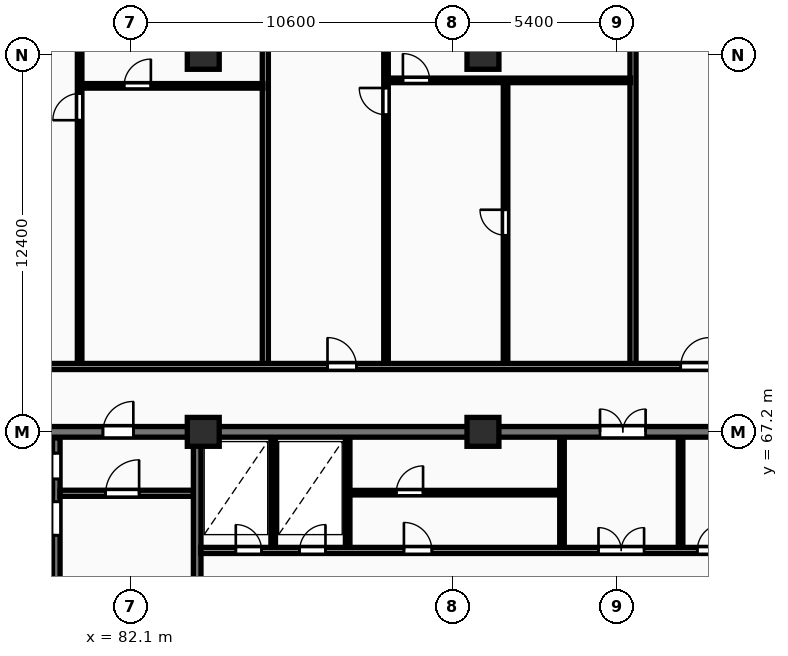
"""IFC4 building model, lengths in metres.
Left out: names, types, materials, properties, quantities, classifications, styles, units other than length and angle.
Written with IfcOpenShell. Run it as: python <this file> out.ifc"""

import sys

from ifc_helpers import new_model, si_unit, direction, frame, frame_2d, origin, origin_2d, place, context, subcontext, project, spatial, rectangle, extrude, element, fill, save


model = new_model("IFC4")
c1 = context("Model", 3, precision=1e-05, world=origin(), true_north=direction((0.0, 1.0)))
c2 = subcontext(c1, "Body", "Model", "MODEL_VIEW")
j1 = project(units=[si_unit("LENGTHUNIT", "METRE"), si_unit("PLANEANGLEUNIT", "RADIAN")], contexts=[c1])
p1 = place(None, origin())
s1 = spatial("IfcSite", under=j1, at=p1, CompositionType="ELEMENT")
p2 = place(p1, origin())
s2 = spatial("IfcBuilding", under=s1, at=p2, CompositionType="ELEMENT")
p3 = place(p2, frame((0.0, 0.0, 24.0)))
s3 = spatial("IfcBuildingStorey", under=s2, at=p3, CompositionType="ELEMENT", Elevation=24.0)
for number, where, z_axis, x_axis in (
    (1, (84.5, 67.2, 0.0), (0.0, 0.0, 1.0), (1.0, 0.0, 0.0)),
    (2, (84.5, 79.6, 0.0), (0.0, 0.0, 1.0), (1.0, 0.0, 0.0)),
    (3, (93.7, 67.2, 0.0), (0.0, 0.0, 1.0), (1.0, 0.0, 0.0)),
    (4, (93.7, 79.6, 0.0), (0.0, 0.0, 1.0), (1.0, 0.0, 0.0)),
):
    element("IfcColumn", number, at=place(p3, frame(where, z_axis=z_axis, x_axis=x_axis)), inside=s3, PredefinedType="COLUMN", context=c2, shape_type="SweptSolid", body=[
        extrude(rectangle(XDim=1.05, YDim=0.95, at=origin_2d()), origin(), (0.0, 0.0, 1.0), 3.25),
    ])
p4 = place(p3, frame((75.95, 67.2, 0.0), z_axis=(0.0, 0.0, 1.0), x_axis=(1.0, 0.0, 0.0)))
e5 = element("IfcWall", 5, at=p4, inside=s3, PredefinedType="SHEAR", context=c2, shape_type="SweptSolid", body=[
    extrude(rectangle(XDim=36.3, YDim=0.35, at=frame_2d((18.15, 0.0))), origin(), (0.0, 0.0, 1.0), 3.25),
])
p5 = place(p4, frame((5.25, 0.0, 0.0)))
e6 = element("IfcOpeningElement", 6, at=p5, cuts=e5, PredefinedType="OPENING", context=c2, shape_type="SweptSolid", body=[
    extrude(rectangle(XDim=1.0, YDim=2.15, at=frame_2d((0.5, 1.075))), frame((0.0, 0.185, 0.0), z_axis=(0.0, -1.0, 0.0), x_axis=(1.0, 0.0, 0.0)), (0.0, 0.0, 1.0), 0.37),
])
p6 = place(p4, frame((21.6, 0.0, 0.0)))
e7 = element("IfcOpeningElement", 7, at=p6, cuts=e5, PredefinedType="OPENING", context=c2, shape_type="SweptSolid", body=[
    extrude(rectangle(XDim=1.5, YDim=2.2, at=frame_2d((0.75, 1.1))), frame((0.0, 0.185, 0.0), z_axis=(0.0, -1.0, 0.0), x_axis=(1.0, 0.0, 0.0)), (0.0, 0.0, 1.0), 0.37),
])
p7 = place(p4, frame((30.45, 0.0, 0.0)))
e8 = element("IfcOpeningElement", 8, at=p7, cuts=e5, PredefinedType="OPENING", context=c2, shape_type="SweptSolid", body=[
    extrude(rectangle(XDim=1.0, YDim=2.15, at=frame_2d((0.5, 1.075))), frame((0.0, 0.185, 0.0), z_axis=(0.0, -1.0, 0.0), x_axis=(1.0, 0.0, 0.0)), (0.0, 0.0, 1.0), 0.37),
])
p8 = place(p3, frame((79.665, 55.4, 0.0), z_axis=(0.0, 0.0, 1.0), x_axis=(0.0, 1.0, 0.0)))
e9 = element("IfcWall", 9, at=p8, inside=s3, PredefinedType="SHEAR", context=c2, shape_type="SweptSolid", body=[
    extrude(rectangle(XDim=11.6, YDim=0.25, at=frame_2d((5.8, 0.0))), origin(), (0.0, 0.0, 1.0), 3.25),
])
p9 = place(p8, frame((0.55, 0.0, 0.0)))
e10 = element("IfcOpeningElement", 10, at=p9, cuts=e9, PredefinedType="OPENING", context=c2, shape_type="SweptSolid", body=[
    extrude(rectangle(XDim=0.85, YDim=2.05, at=frame_2d((0.425, 1.025))), frame((0.0, 0.135, 0.0), z_axis=(0.0, -1.0, 0.0), x_axis=(1.0, 0.0, 0.0)), (0.0, 0.0, 1.0), 0.27),
])
p10 = place(p8, frame((8.4, 0.0, 0.0)))
e11 = element("IfcOpeningElement", 11, at=p10, cuts=e9, PredefinedType="OPENING", context=c2, shape_type="SweptSolid", body=[
    extrude(rectangle(XDim=1.1, YDim=2.1, at=frame_2d((0.55, 1.05))), frame((0.0, 0.135, 0.0), z_axis=(0.0, -1.0, 0.0), x_axis=(1.0, 0.0, 0.0)), (0.0, 0.0, 1.0), 0.27),
])
p11 = place(p8, frame((10.25, 0.0, 0.0)))
e12 = element("IfcOpeningElement", 12, at=p11, cuts=e9, PredefinedType="OPENING", context=c2, shape_type="SweptSolid", body=[
    extrude(rectangle(XDim=0.85, YDim=2.05, at=frame_2d((0.425, 1.025))), frame((0.0, 0.135, 0.0), z_axis=(0.0, -1.0, 0.0), x_axis=(1.0, 0.0, 0.0)), (0.0, 0.0, 1.0), 0.27),
])
p12 = place(p3, frame((76.3, 65.325, 0.0), z_axis=(0.0, 0.0, 1.0), x_axis=(1.0, 0.0, 0.0)))
e13 = element("IfcWall", 13, at=p12, inside=s3, PredefinedType="SHEAR", context=c2, shape_type="SweptSolid", body=[
    extrude(rectangle(XDim=3.24, YDim=0.25, at=frame_2d((1.62, 0.0))), origin(), (0.0, 0.0, 1.0), 3.25),
])
p13 = place(p3, frame((79.79, 65.18, 0.0), z_axis=(0.0, 0.0, 1.0), x_axis=(1.0, 0.0, 0.0)))
e14 = element("IfcWall", 14, at=p13, inside=s3, PredefinedType="PARTITIONING", context=c2, shape_type="SweptSolid", body=[
    extrude(rectangle(XDim=4.39, YDim=0.2, at=frame_2d((2.195, 0.0))), origin(), (0.0, 0.0, 1.0), 2.97),
])
p14 = place(p13, frame((1.5, 0.0, 0.0)))
e15 = element("IfcOpeningElement", 15, at=p14, cuts=e14, PredefinedType="OPENING", context=c2, shape_type="SweptSolid", body=[
    extrude(rectangle(XDim=1.1, YDim=2.1, at=frame_2d((0.55, 1.05))), frame((0.0, 0.11, 0.0), z_axis=(0.0, -1.0, 0.0), x_axis=(1.0, 0.0, 0.0)), (0.0, 0.0, 1.0), 0.22),
])
p15 = place(p3, frame((84.3, 55.4, 0.0), z_axis=(0.0, 0.0, 1.0), x_axis=(0.0, 1.0, 0.0)))
e16 = element("IfcWall", 16, at=p15, inside=s3, PredefinedType="SHEAR", context=c2, shape_type="SweptSolid", body=[
    extrude(rectangle(XDim=11.6, YDim=0.25, at=frame_2d((5.8, 0.0))), origin(), (0.0, 0.0, 1.0), 3.25),
])
p16 = place(p15, frame((5.2, 0.0, 0.0)))
e17 = element("IfcOpeningElement", 17, at=p16, cuts=e16, PredefinedType="OPENING", context=c2, shape_type="SweptSolid", body=[
    extrude(rectangle(XDim=1.1, YDim=2.1, at=frame_2d((0.55, 1.05))), frame((0.0, 0.135, 0.0), z_axis=(0.0, -1.0, 0.0), x_axis=(1.0, 0.0, 0.0)), (0.0, 0.0, 1.0), 0.27),
])
for number, where, z_axis, x_axis in (
    (18, (86.8, 63.4, 0.0), (0.0, 0.0, 1.0), (0.0, 1.0, 0.0)),
    (19, (89.25, 63.4, 0.0), (0.0, 0.0, 1.0), (0.0, 1.0, 0.0)),
):
    element("IfcWall", number, at=place(p3, frame(where, z_axis=z_axis, x_axis=x_axis)), inside=s3, PredefinedType="PARTITIONING", context=c2, shape_type="SweptSolid", body=[
        extrude(rectangle(XDim=3.6, YDim=0.15, at=frame_2d((1.8, 0.0))), origin(), (0.0, 0.0, 1.0), 2.97),
    ])
p17 = place(p3, frame((89.25, 65.2, 0.0), z_axis=(0.0, 0.0, 1.0), x_axis=(1.0, 0.0, 0.0)))
e20 = element("IfcWall", 20, at=p17, inside=s3, PredefinedType="PARTITIONING", context=c2, shape_type="SweptSolid", body=[
    extrude(rectangle(XDim=7.05, YDim=0.15, at=frame_2d((3.525, 0.0))), origin(), (0.0, 0.0, 1.0), 2.97),
])
p18 = place(p17, frame((1.6, 0.0, 0.0)))
e21 = element("IfcOpeningElement", 21, at=p18, cuts=e20, PredefinedType="OPENING", context=c2, shape_type="SweptSolid", body=[
    extrude(rectangle(XDim=0.88, YDim=2.06, at=frame_2d((0.44, 1.03))), frame((0.0, 0.085, 0.0), z_axis=(0.0, -1.0, 0.0), x_axis=(1.0, 0.0, 0.0)), (0.0, 0.0, 1.0), 0.17),
])
for number, where, z_axis, x_axis in (
    (22, (96.3, 63.4, 0.0), (0.0, 0.0, 1.0), (0.0, 1.0, 0.0)),
    (23, (100.2, 63.4, 0.0), (0.0, 0.0, 1.0), (0.0, 1.0, 0.0)),
):
    element("IfcWall", number, at=place(p3, frame(where, z_axis=z_axis, x_axis=x_axis)), inside=s3, PredefinedType="PARTITIONING", context=c2, shape_type="SweptSolid", body=[
        extrude(rectangle(XDim=3.6, YDim=0.15, at=frame_2d((1.8, 0.0))), origin(), (0.0, 0.0, 1.0), 2.97),
    ])
p19 = place(p3, frame((84.42, 63.3, 0.0), z_axis=(0.0, 0.0, 1.0), x_axis=(1.0, 0.0, 0.0)))
e24 = element("IfcWall", 24, at=p19, inside=s3, PredefinedType="PARTITIONING", context=c2, shape_type="SweptSolid", body=[
    extrude(rectangle(XDim=19.83, YDim=0.2, at=frame_2d((9.915, 0.0))), origin(), (0.0, 0.0, 1.0), 2.97),
])
p20 = place(p19, frame((1.15, 0.0, 0.0)))
e25 = element("IfcOpeningElement", 25, at=p20, cuts=e24, PredefinedType="OPENING", context=c2, shape_type="SweptSolid", body=[
    extrude(rectangle(XDim=0.85, YDim=2.05, at=frame_2d((0.425, 1.025))), frame((0.0, 0.11, 0.0), z_axis=(0.0, -1.0, 0.0), x_axis=(1.0, 0.0, 0.0)), (0.0, 0.0, 1.0), 0.22),
])
p21 = place(p19, frame((3.25, 0.0, 0.0)))
e26 = element("IfcOpeningElement", 26, at=p21, cuts=e24, PredefinedType="OPENING", context=c2, shape_type="SweptSolid", body=[
    extrude(rectangle(XDim=0.85, YDim=2.05, at=frame_2d((0.425, 1.025))), frame((0.0, 0.11, 0.0), z_axis=(0.0, -1.0, 0.0), x_axis=(1.0, 0.0, 0.0)), (0.0, 0.0, 1.0), 0.22),
])
p22 = place(p19, frame((13.08, 0.0, 0.0)))
e27 = element("IfcOpeningElement", 27, at=p22, cuts=e24, PredefinedType="OPENING", context=c2, shape_type="SweptSolid", body=[
    extrude(rectangle(XDim=1.5, YDim=2.2, at=frame_2d((0.75, 1.1))), frame((0.0, 0.11, 0.0), z_axis=(0.0, -1.0, 0.0), x_axis=(1.0, 0.0, 0.0)), (0.0, 0.0, 1.0), 0.22),
])
p23 = place(p19, frame((6.68, 0.0, 0.0)))
e28 = element("IfcOpeningElement", 28, at=p23, cuts=e24, PredefinedType="OPENING", context=c2, shape_type="SweptSolid", body=[
    extrude(rectangle(XDim=0.92, YDim=2.08, at=frame_2d((0.46, 1.04))), frame((0.0, 0.11, 0.0), z_axis=(0.0, -1.0, 0.0), x_axis=(1.0, 0.0, 0.0)), (0.0, 0.0, 1.0), 0.22),
])
p24 = place(p19, frame((16.33, 0.0, 0.0)))
e29 = element("IfcOpeningElement", 29, at=p24, cuts=e24, PredefinedType="OPENING", context=c2, shape_type="SweptSolid", body=[
    extrude(rectangle(XDim=0.88, YDim=2.06, at=frame_2d((0.44, 1.03))), frame((0.0, 0.11, 0.0), z_axis=(0.0, -1.0, 0.0), x_axis=(1.0, 0.0, 0.0)), (0.0, 0.0, 1.0), 0.22),
])
p25 = place(p3, frame((86.542, 69.43, 0.0), z_axis=(0.0, 0.0, 1.0), x_axis=(0.0, 1.0, 0.0)))
e30 = element("IfcWall", 30, at=p25, inside=s3, PredefinedType="PARTITIONING", context=c2, shape_type="SweptSolid", body=[
    extrude(rectangle(XDim=29.07, YDim=0.2, at=frame_2d((14.535, 0.0))), origin(), (0.0, 0.0, 1.0), 2.97),
])
p26 = place(p3, frame((80.494, 78.58, 0.0), z_axis=(0.0, 0.0, 1.0), x_axis=(1.0, 0.0, 0.0)))
e31 = element("IfcWall", 31, at=p26, inside=s3, PredefinedType="PARTITIONING", context=c2, shape_type="SweptSolid", body=[
    extrude(rectangle(XDim=5.968, YDim=0.15, at=frame_2d((2.984, 0.0))), origin(), (0.0, 0.0, 1.0), 2.97),
])
p27 = place(p26, frame((1.403, 0.0, 0.0)))
e32 = element("IfcOpeningElement", 32, at=p27, cuts=e31, PredefinedType="OPENING", context=c2, shape_type="SweptSolid", body=[
    extrude(rectangle(XDim=0.88, YDim=2.06, at=frame_2d((0.44, 1.03))), frame((0.0, 0.085, 0.0), z_axis=(0.0, -1.0, 0.0), x_axis=(1.0, 0.0, 0.0)), (0.0, 0.0, 1.0), 0.17),
])
p28 = place(p3, frame((80.434, 69.41, 0.0), z_axis=(0.0, 0.0, 1.0), x_axis=(0.0, 1.0, 0.0)))
e33 = element("IfcWall", 33, at=p28, inside=s3, PredefinedType="PARTITIONING", context=c2, shape_type="SweptSolid", body=[
    extrude(rectangle(XDim=18.7, YDim=0.15, at=frame_2d((9.35, 0.0))), origin(), (0.0, 0.0, 1.0), 2.97),
])
p29 = place(p28, frame((8.04, 0.0, 0.0)))
e34 = element("IfcOpeningElement", 34, at=p29, cuts=e33, PredefinedType="OPENING", context=c2, shape_type="SweptSolid", body=[
    extrude(rectangle(XDim=0.88, YDim=2.06, at=frame_2d((0.44, 1.03))), frame((0.0, 0.085, 0.0), z_axis=(0.0, -1.0, 0.0), x_axis=(1.0, 0.0, 0.0)), (0.0, 0.0, 1.0), 0.17),
])
p30 = place(p3, frame((98.635, 69.43, 0.0), z_axis=(0.0, 0.0, 1.0), x_axis=(0.0, 1.0, 0.0)))
e35 = element("IfcWall", 35, at=p30, inside=s3, PredefinedType="PARTITIONING", context=c2, shape_type="SweptSolid", body=[
    extrude(rectangle(XDim=29.07, YDim=0.2, at=frame_2d((14.535, 0.0))), origin(), (0.0, 0.0, 1.0), 2.97),
])
p31 = place(p3, frame((94.443, 69.41, 0.0), z_axis=(0.0, 0.0, 1.0), x_axis=(0.0, 1.0, 0.0)))
e36 = element("IfcWall", 36, at=p31, inside=s3, PredefinedType="PARTITIONING", context=c2, shape_type="SweptSolid", body=[
    extrude(rectangle(XDim=9.35, YDim=0.15, at=frame_2d((4.675, 0.0))), origin(), (0.0, 0.0, 1.0), 2.97),
])
p32 = place(p31, frame((4.255, 0.0, 0.0)))
e37 = element("IfcOpeningElement", 37, at=p32, cuts=e36, PredefinedType="OPENING", context=c2, shape_type="SweptSolid", body=[
    extrude(rectangle(XDim=0.84, YDim=2.04, at=frame_2d((0.42, 1.02))), frame((0.0, 0.085, 0.0), z_axis=(0.0, -1.0, 0.0), x_axis=(1.0, 0.0, 0.0)), (0.0, 0.0, 1.0), 0.17),
])
p33 = place(p3, frame((90.572, 78.76, 0.0), z_axis=(0.0, 0.0, 1.0), x_axis=(1.0, 0.0, 0.0)))
e38 = element("IfcWall", 38, at=p33, inside=s3, PredefinedType="PARTITIONING", context=c2, shape_type="SweptSolid", body=[
    extrude(rectangle(XDim=7.983, YDim=0.15, at=frame_2d((3.992, 0.0))), origin(), (0.0, 0.0, 1.0), 2.97),
])
p34 = place(p33, frame((0.495, 0.0, 0.0)))
e39 = element("IfcOpeningElement", 39, at=p34, cuts=e38, PredefinedType="OPENING", context=c2, shape_type="SweptSolid", body=[
    extrude(rectangle(XDim=0.88, YDim=2.06, at=frame_2d((0.44, 1.03))), frame((0.0, 0.085, 0.0), z_axis=(0.0, -1.0, 0.0), x_axis=(1.0, 0.0, 0.0)), (0.0, 0.0, 1.0), 0.17),
])
p35 = place(p3, frame((90.511, 69.41, 0.0), z_axis=(0.0, 0.0, 1.0), x_axis=(0.0, 1.0, 0.0)))
e40 = element("IfcWall", 40, at=p35, inside=s3, PredefinedType="PARTITIONING", context=c2, shape_type="SweptSolid", body=[
    extrude(rectangle(XDim=18.7, YDim=0.15, at=frame_2d((9.35, 0.0))), origin(), (0.0, 0.0, 1.0), 2.97),
])
p36 = place(p35, frame((8.22, 0.0, 0.0)))
e41 = element("IfcOpeningElement", 41, at=p36, cuts=e40, PredefinedType="OPENING", context=c2, shape_type="SweptSolid", body=[
    extrude(rectangle(XDim=0.88, YDim=2.06, at=frame_2d((0.44, 1.03))), frame((0.0, 0.085, 0.0), z_axis=(0.0, -1.0, 0.0), x_axis=(1.0, 0.0, 0.0)), (0.0, 0.0, 1.0), 0.17),
])
p37 = place(p3, frame((55.3, 69.35, 0.0), z_axis=(0.0, 0.0, 1.0), x_axis=(1.0, 0.0, 0.0)))
e42 = element("IfcWall", 42, at=p37, inside=s3, PredefinedType="PARTITIONING", context=c2, shape_type="SweptSolid", body=[
    extrude(rectangle(XDim=77.6, YDim=0.2, at=frame_2d((38.8, 0.0))), origin(), (0.0, 0.0, 1.0), 2.97),
])
p38 = place(p37, frame((1.81, 0.0, 0.0)))
e43 = element("IfcOpeningElement", 43, at=p38, cuts=e42, PredefinedType="OPENING", context=c2, shape_type="SweptSolid", body=[
    extrude(rectangle(XDim=0.95, YDim=2.15, at=frame_2d((0.475, 1.075))), frame((0.0, 0.11, 0.0), z_axis=(0.0, -1.0, 0.0), x_axis=(1.0, 0.0, 0.0)), (0.0, 0.0, 1.0), 0.22),
])
p39 = place(p37, frame((10.448, 0.0, 0.0)))
e44 = element("IfcOpeningElement", 44, at=p39, cuts=e42, PredefinedType="OPENING", context=c2, shape_type="SweptSolid", body=[
    extrude(rectangle(XDim=0.95, YDim=2.15, at=frame_2d((0.475, 1.075))), frame((0.0, 0.11, 0.0), z_axis=(0.0, -1.0, 0.0), x_axis=(1.0, 0.0, 0.0)), (0.0, 0.0, 1.0), 0.22),
])
p40 = place(p37, frame((23.208, 0.0, 0.0)))
e45 = element("IfcOpeningElement", 45, at=p40, cuts=e42, PredefinedType="OPENING", context=c2, shape_type="SweptSolid", body=[
    extrude(rectangle(XDim=0.95, YDim=2.15, at=frame_2d((0.475, 1.075))), frame((0.0, 0.11, 0.0), z_axis=(0.0, -1.0, 0.0), x_axis=(1.0, 0.0, 0.0)), (0.0, 0.0, 1.0), 0.22),
])
p41 = place(p37, frame((33.287, 0.0, 0.0)))
e46 = element("IfcOpeningElement", 46, at=p41, cuts=e42, PredefinedType="OPENING", context=c2, shape_type="SweptSolid", body=[
    extrude(rectangle(XDim=0.95, YDim=2.15, at=frame_2d((0.475, 1.075))), frame((0.0, 0.11, 0.0), z_axis=(0.0, -1.0, 0.0), x_axis=(1.0, 0.0, 0.0)), (0.0, 0.0, 1.0), 0.22),
])
p42 = place(p37, frame((44.905, 0.0, 0.0)))
e47 = element("IfcOpeningElement", 47, at=p42, cuts=e42, PredefinedType="OPENING", context=c2, shape_type="SweptSolid", body=[
    extrude(rectangle(XDim=0.95, YDim=2.15, at=frame_2d((0.475, 1.075))), frame((0.0, 0.11, 0.0), z_axis=(0.0, -1.0, 0.0), x_axis=(1.0, 0.0, 0.0)), (0.0, 0.0, 1.0), 0.22),
])
p43 = place(p37, frame((54.119, 0.0, 0.0)))
e48 = element("IfcOpeningElement", 48, at=p43, cuts=e42, PredefinedType="OPENING", context=c2, shape_type="SweptSolid", body=[
    extrude(rectangle(XDim=0.95, YDim=2.15, at=frame_2d((0.475, 1.075))), frame((0.0, 0.11, 0.0), z_axis=(0.0, -1.0, 0.0), x_axis=(1.0, 0.0, 0.0)), (0.0, 0.0, 1.0), 0.22),
])
p44 = place(p37, frame((66.74, 0.0, 0.0)))
e49 = element("IfcOpeningElement", 49, at=p44, cuts=e42, PredefinedType="OPENING", context=c2, shape_type="SweptSolid", body=[
    extrude(rectangle(XDim=0.95, YDim=2.15, at=frame_2d((0.475, 1.075))), frame((0.0, 0.11, 0.0), z_axis=(0.0, -1.0, 0.0), x_axis=(1.0, 0.0, 0.0)), (0.0, 0.0, 1.0), 0.22),
])
p45 = place(p5, origin())
e50 = element("IfcDoor", 50, at=p45, inside=s3, OperationType="SINGLE_SWING_RIGHT", PredefinedType="DOOR", context=c2, shape_type="SweptSolid", body=[
    extrude(rectangle(XDim=1.0, YDim=2.15, at=frame_2d((0.5, 1.075))), frame((0.0, 0.025, 0.0), z_axis=(0.0, -1.0, 0.0), x_axis=(1.0, 0.0, 0.0)), (0.0, 0.0, 1.0), 0.05),
])
fill(e6, e50)
p46 = place(p6, origin())
e51 = element("IfcDoor", 51, at=p46, inside=s3, OperationType="DOUBLE_DOOR_SINGLE_SWING", PredefinedType="DOOR", context=c2, shape_type="SweptSolid", body=[
    extrude(rectangle(XDim=1.5, YDim=2.2, at=frame_2d((0.75, 1.1))), frame((0.0, 0.025, 0.0), z_axis=(0.0, -1.0, 0.0), x_axis=(1.0, 0.0, 0.0)), (0.0, 0.0, 1.0), 0.05),
])
fill(e7, e51)
p47 = place(p10, origin())
e52 = element("IfcDoor", 52, at=p47, inside=s3, OperationType="SINGLE_SWING_LEFT", PredefinedType="DOOR", context=c2, shape_type="SweptSolid", body=[
    extrude(rectangle(XDim=1.1, YDim=2.1, at=frame_2d((0.55, 1.05))), frame((0.0, 0.025, 0.0), z_axis=(0.0, -1.0, 0.0), x_axis=(1.0, 0.0, 0.0)), (0.0, 0.0, 1.0), 0.05),
])
fill(e11, e52)
p48 = place(p11, origin())
e53 = element("IfcDoor", 53, at=p48, inside=s3, OperationType="SINGLE_SWING_RIGHT", PredefinedType="DOOR", context=c2, shape_type="SweptSolid", body=[
    extrude(rectangle(XDim=0.85, YDim=2.05, at=frame_2d((0.425, 1.025))), frame((0.0, 0.025, 0.0), z_axis=(0.0, -1.0, 0.0), x_axis=(1.0, 0.0, 0.0)), (0.0, 0.0, 1.0), 0.05),
])
fill(e12, e53)
p49 = place(p14, origin())
e54 = element("IfcDoor", 54, at=p49, inside=s3, OperationType="SINGLE_SWING_RIGHT", PredefinedType="DOOR", context=c2, shape_type="SweptSolid", body=[
    extrude(rectangle(XDim=1.1, YDim=2.1, at=frame_2d((0.55, 1.05))), frame((0.0, 0.025, 0.0), z_axis=(0.0, -1.0, 0.0), x_axis=(1.0, 0.0, 0.0)), (0.0, 0.0, 1.0), 0.05),
])
fill(e15, e54)
p50 = place(p18, origin())
e55 = element("IfcDoor", 55, at=p50, inside=s3, OperationType="SINGLE_SWING_RIGHT", PredefinedType="DOOR", context=c2, shape_type="SweptSolid", body=[
    extrude(rectangle(XDim=0.88, YDim=2.06, at=frame_2d((0.44, 1.03))), frame((0.0, 0.025, 0.0), z_axis=(0.0, -1.0, 0.0), x_axis=(1.0, 0.0, 0.0)), (0.0, 0.0, 1.0), 0.05),
])
fill(e21, e55)
p51 = place(p20, origin())
e56 = element("IfcDoor", 56, at=p51, inside=s3, OperationType="SINGLE_SWING_LEFT", PredefinedType="DOOR", context=c2, shape_type="SweptSolid", body=[
    extrude(rectangle(XDim=0.85, YDim=2.05, at=frame_2d((0.425, 1.025))), frame((0.0, 0.025, 0.0), z_axis=(0.0, -1.0, 0.0), x_axis=(1.0, 0.0, 0.0)), (0.0, 0.0, 1.0), 0.05),
])
fill(e25, e56)
p52 = place(p21, origin())
e57 = element("IfcDoor", 57, at=p52, inside=s3, OperationType="SINGLE_SWING_RIGHT", PredefinedType="DOOR", context=c2, shape_type="SweptSolid", body=[
    extrude(rectangle(XDim=0.85, YDim=2.05, at=frame_2d((0.425, 1.025))), frame((0.0, 0.025, 0.0), z_axis=(0.0, -1.0, 0.0), x_axis=(1.0, 0.0, 0.0)), (0.0, 0.0, 1.0), 0.05),
])
fill(e26, e57)
p53 = place(p22, origin())
e58 = element("IfcDoor", 58, at=p53, inside=s3, OperationType="DOUBLE_DOOR_SINGLE_SWING", PredefinedType="DOOR", context=c2, shape_type="SweptSolid", body=[
    extrude(rectangle(XDim=1.5, YDim=2.2, at=frame_2d((0.75, 1.1))), frame((0.0, 0.025, 0.0), z_axis=(0.0, -1.0, 0.0), x_axis=(1.0, 0.0, 0.0)), (0.0, 0.0, 1.0), 0.05),
])
fill(e27, e58)
p54 = place(p23, origin())
e59 = element("IfcDoor", 59, at=p54, inside=s3, OperationType="SINGLE_SWING_LEFT", PredefinedType="DOOR", context=c2, shape_type="SweptSolid", body=[
    extrude(rectangle(XDim=0.92, YDim=2.08, at=frame_2d((0.46, 1.04))), frame((0.0, 0.025, 0.0), z_axis=(0.0, -1.0, 0.0), x_axis=(1.0, 0.0, 0.0)), (0.0, 0.0, 1.0), 0.05),
])
fill(e28, e59)
p55 = place(p24, origin())
e60 = element("IfcDoor", 60, at=p55, inside=s3, OperationType="SINGLE_SWING_RIGHT", PredefinedType="DOOR", context=c2, shape_type="SweptSolid", body=[
    extrude(rectangle(XDim=0.88, YDim=2.06, at=frame_2d((0.44, 1.03))), frame((0.0, 0.025, 0.0), z_axis=(0.0, -1.0, 0.0), x_axis=(1.0, 0.0, 0.0)), (0.0, 0.0, 1.0), 0.05),
])
fill(e29, e60)
p56 = place(p27, origin())
e61 = element("IfcDoor", 61, at=p56, inside=s3, OperationType="SINGLE_SWING_RIGHT", PredefinedType="DOOR", context=c2, shape_type="SweptSolid", body=[
    extrude(rectangle(XDim=0.88, YDim=2.06, at=frame_2d((0.44, 1.03))), frame((0.0, 0.025, 0.0), z_axis=(0.0, -1.0, 0.0), x_axis=(1.0, 0.0, 0.0)), (0.0, 0.0, 1.0), 0.05),
])
fill(e32, e61)
p57 = place(p29, origin())
e62 = element("IfcDoor", 62, at=p57, inside=s3, OperationType="SINGLE_SWING_LEFT", PredefinedType="DOOR", context=c2, shape_type="SweptSolid", body=[
    extrude(rectangle(XDim=0.88, YDim=2.06, at=frame_2d((0.44, 1.03))), frame((0.0, 0.025, 0.0), z_axis=(0.0, -1.0, 0.0), x_axis=(1.0, 0.0, 0.0)), (0.0, 0.0, 1.0), 0.05),
])
fill(e34, e62)
p58 = place(p32, origin())
e63 = element("IfcDoor", 63, at=p58, inside=s3, OperationType="SINGLE_SWING_RIGHT", PredefinedType="DOOR", context=c2, shape_type="SweptSolid", body=[
    extrude(rectangle(XDim=0.84, YDim=2.04, at=frame_2d((0.42, 1.02))), frame((0.0, 0.025, 0.0), z_axis=(0.0, -1.0, 0.0), x_axis=(1.0, 0.0, 0.0)), (0.0, 0.0, 1.0), 0.05),
])
fill(e37, e63)
p59 = place(p34, origin())
e64 = element("IfcDoor", 64, at=p59, inside=s3, OperationType="SINGLE_SWING_LEFT", PredefinedType="DOOR", context=c2, shape_type="SweptSolid", body=[
    extrude(rectangle(XDim=0.88, YDim=2.06, at=frame_2d((0.44, 1.03))), frame((0.0, 0.025, 0.0), z_axis=(0.0, -1.0, 0.0), x_axis=(1.0, 0.0, 0.0)), (0.0, 0.0, 1.0), 0.05),
])
fill(e39, e64)
p60 = place(p36, origin())
e65 = element("IfcDoor", 65, at=p60, inside=s3, OperationType="SINGLE_SWING_RIGHT", PredefinedType="DOOR", context=c2, shape_type="SweptSolid", body=[
    extrude(rectangle(XDim=0.88, YDim=2.06, at=frame_2d((0.44, 1.03))), frame((0.0, 0.025, 0.0), z_axis=(0.0, -1.0, 0.0), x_axis=(1.0, 0.0, 0.0)), (0.0, 0.0, 1.0), 0.05),
])
fill(e41, e65)
p61 = place(p41, origin())
e66 = element("IfcDoor", 66, at=p61, inside=s3, OperationType="SINGLE_SWING_LEFT", PredefinedType="DOOR", context=c2, shape_type="SweptSolid", body=[
    extrude(rectangle(XDim=0.95, YDim=2.15, at=frame_2d((0.475, 1.075))), frame((0.0, 0.025, 0.0), z_axis=(0.0, -1.0, 0.0), x_axis=(1.0, 0.0, 0.0)), (0.0, 0.0, 1.0), 0.05),
])
fill(e46, e66)
p62 = place(p42, origin())
e67 = element("IfcDoor", 67, at=p62, inside=s3, OperationType="SINGLE_SWING_RIGHT", PredefinedType="DOOR", context=c2, shape_type="SweptSolid", body=[
    extrude(rectangle(XDim=0.95, YDim=2.15, at=frame_2d((0.475, 1.075))), frame((0.0, 0.025, 0.0), z_axis=(0.0, -1.0, 0.0), x_axis=(1.0, 0.0, 0.0)), (0.0, 0.0, 1.0), 0.05),
])
fill(e47, e67)
save(model, sys.argv[1])
